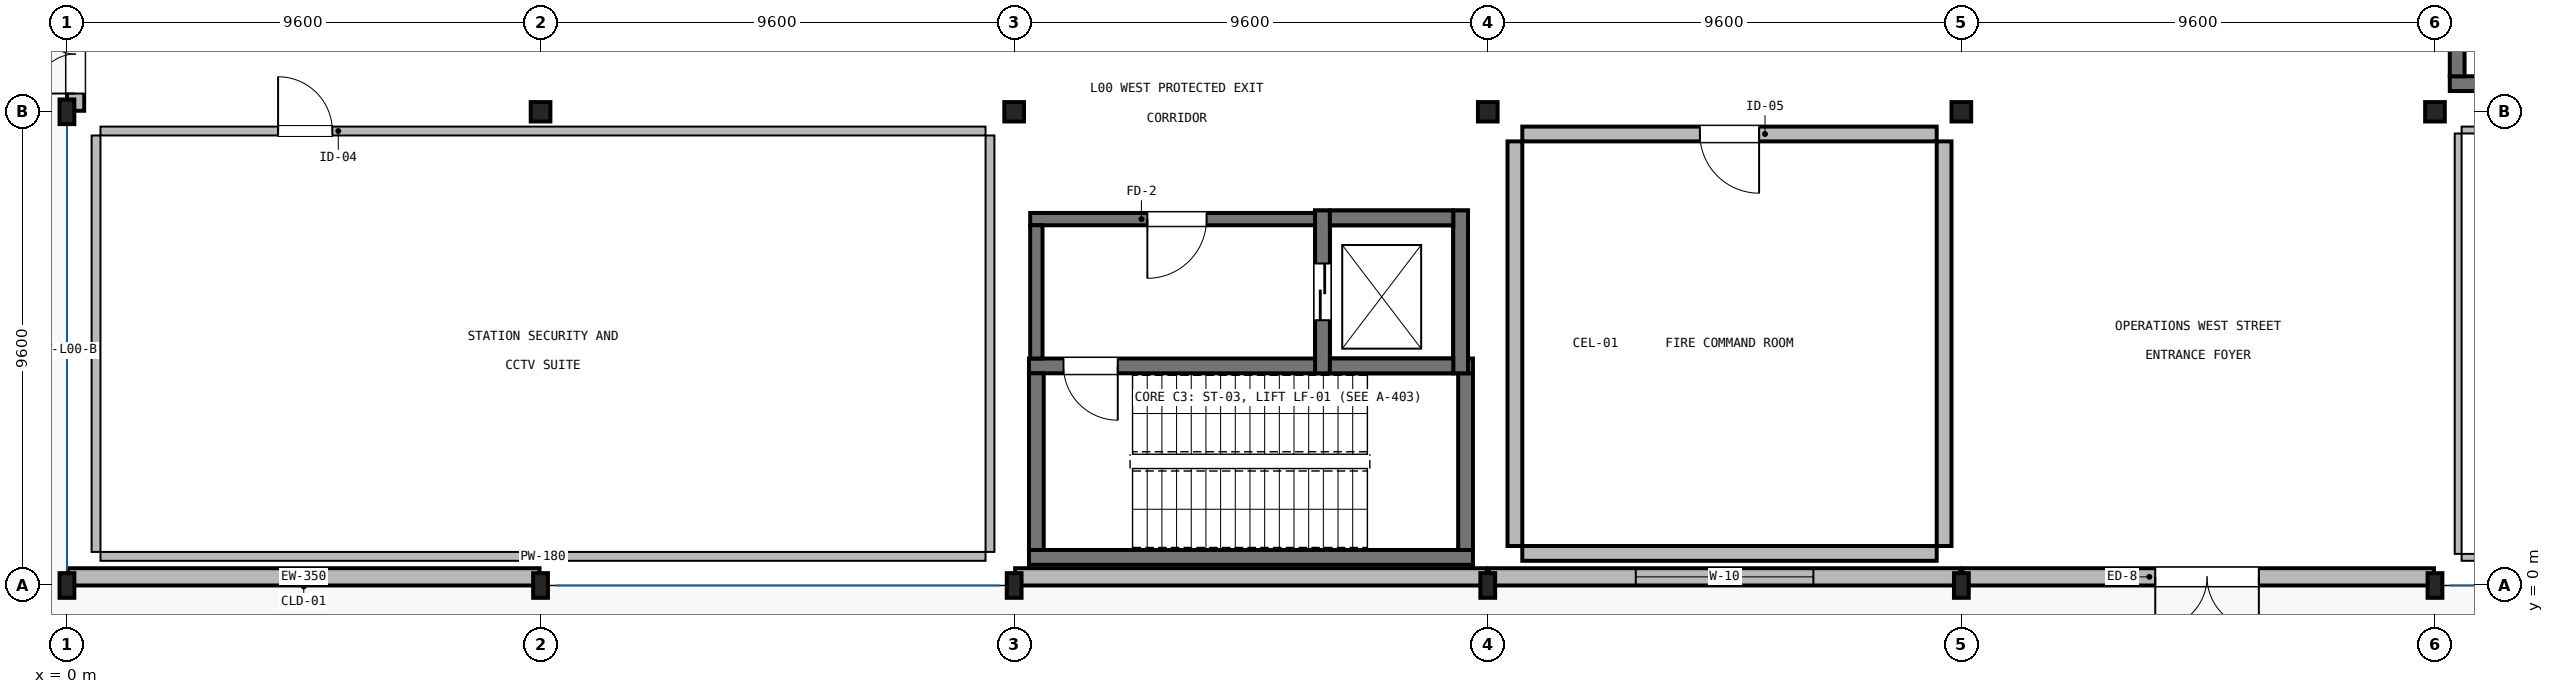
"""IFC4 building model, lengths in metres.
Left out: names, types, materials, properties, quantities, classifications, styles, units other than length and angle.
Written with IfcOpenShell. Run it as: python <this file> out.ifc"""

import sys

from ifc_helpers import new_model, si_unit, direction, frame, frame_2d, origin, origin_2d, place, context, subcontext, project, spatial, rectangle, i_section, extrude, element, fill, save


model = new_model("IFC4")
c1 = context("Model", 3, precision=1e-05, world=origin(), true_north=direction((0.0, 1.0)))
c2 = subcontext(c1, "Body", "Model", "MODEL_VIEW")
j1 = project(units=[si_unit("LENGTHUNIT", "METRE"), si_unit("PLANEANGLEUNIT", "RADIAN")], contexts=[c1])
p1 = place(None, origin())
s1 = spatial("IfcSite", under=j1, at=p1, CompositionType="ELEMENT")
p2 = place(p1, origin())
s2 = spatial("IfcBuilding", under=s1, at=p2, CompositionType="ELEMENT")
p3 = place(p2, origin())
s3 = spatial("IfcBuildingStorey", under=s2, at=p3, CompositionType="ELEMENT", Elevation=0.0)
for number, where, z_axis, x_axis in (
    (1, (0.0, 0.0, -0.36), (0.0, 0.0, 1.0), (1.0, 0.0, 0.0)),
    (2, (0.0, 9.6, -0.36), (0.0, 0.0, 1.0), (1.0, 0.0, 0.0)),
    (3, (9.6, 0.0, -0.36), (0.0, 0.0, 1.0), (1.0, 0.0, 0.0)),
):
    element("IfcColumn", number, at=place(p3, frame(where, z_axis=z_axis, x_axis=x_axis)), inside=s3, PredefinedType="COLUMN", context=c2, shape_type="SweptSolid", body=[
        extrude(i_section(OverallWidth=0.3, OverallDepth=0.5, WebThickness=0.014, FlangeThickness=0.028, FilletRadius=0.027, at=origin_2d()), origin(), (0.0, 0.0, 1.0), 6.11),
    ])
p4 = place(p3, frame((9.6, 9.6, -0.36), z_axis=(0.0, 0.0, 1.0), x_axis=(1.0, 0.0, 0.0)))
e4 = element("IfcColumn", 4, at=p4, inside=s3, PredefinedType="COLUMN", context=c2, shape_type="SweptSolid", body=[
    extrude(i_section(OverallWidth=0.399, OverallDepth=0.394, WebThickness=0.023, FlangeThickness=0.037, FilletRadius=0.015, at=origin_2d()), origin(), (0.0, 0.0, 1.0), 6.11),
])
p5 = place(p3, frame((19.2, 0.0, -0.36), z_axis=(0.0, 0.0, 1.0), x_axis=(1.0, 0.0, 0.0)))
e5 = element("IfcColumn", 5, at=p5, inside=s3, PredefinedType="COLUMN", context=c2, shape_type="SweptSolid", body=[
    extrude(i_section(OverallWidth=0.3, OverallDepth=0.5, WebThickness=0.014, FlangeThickness=0.028, FilletRadius=0.027, at=origin_2d()), origin(), (0.0, 0.0, 1.0), 6.11),
])
p6 = place(p3, frame((19.2, 9.6, -0.36), z_axis=(0.0, 0.0, 1.0), x_axis=(1.0, 0.0, 0.0)))
e6 = element("IfcColumn", 6, at=p6, inside=s3, PredefinedType="COLUMN", context=c2, shape_type="SweptSolid", body=[
    extrude(i_section(OverallWidth=0.399, OverallDepth=0.394, WebThickness=0.023, FlangeThickness=0.037, FilletRadius=0.015, at=origin_2d()), origin(), (0.0, 0.0, 1.0), 6.11),
])
p7 = place(p3, frame((28.8, 0.0, -0.36), z_axis=(0.0, 0.0, 1.0), x_axis=(1.0, 0.0, 0.0)))
e7 = element("IfcColumn", 7, at=p7, inside=s3, PredefinedType="COLUMN", context=c2, shape_type="SweptSolid", body=[
    extrude(i_section(OverallWidth=0.3, OverallDepth=0.5, WebThickness=0.014, FlangeThickness=0.028, FilletRadius=0.027, at=origin_2d()), origin(), (0.0, 0.0, 1.0), 6.11),
])
p8 = place(p3, frame((28.8, 9.6, -0.36), z_axis=(0.0, 0.0, 1.0), x_axis=(1.0, 0.0, 0.0)))
e8 = element("IfcColumn", 8, at=p8, inside=s3, PredefinedType="COLUMN", context=c2, shape_type="SweptSolid", body=[
    extrude(i_section(OverallWidth=0.399, OverallDepth=0.394, WebThickness=0.023, FlangeThickness=0.037, FilletRadius=0.015, at=origin_2d()), origin(), (0.0, 0.0, 1.0), 6.11),
])
p9 = place(p3, frame((38.4, 0.0, -0.36), z_axis=(0.0, 0.0, 1.0), x_axis=(1.0, 0.0, 0.0)))
e9 = element("IfcColumn", 9, at=p9, inside=s3, PredefinedType="COLUMN", context=c2, shape_type="SweptSolid", body=[
    extrude(i_section(OverallWidth=0.3, OverallDepth=0.5, WebThickness=0.014, FlangeThickness=0.028, FilletRadius=0.027, at=origin_2d()), origin(), (0.0, 0.0, 1.0), 6.11),
])
p10 = place(p3, frame((38.4, 9.6, -0.36), z_axis=(0.0, 0.0, 1.0), x_axis=(1.0, 0.0, 0.0)))
e10 = element("IfcColumn", 10, at=p10, inside=s3, PredefinedType="COLUMN", context=c2, shape_type="SweptSolid", body=[
    extrude(i_section(OverallWidth=0.399, OverallDepth=0.394, WebThickness=0.023, FlangeThickness=0.037, FilletRadius=0.015, at=origin_2d()), origin(), (0.0, 0.0, 1.0), 6.11),
])
p11 = place(p3, frame((48.0, 0.0, -0.36), z_axis=(0.0, 0.0, 1.0), x_axis=(1.0, 0.0, 0.0)))
e11 = element("IfcColumn", 11, at=p11, inside=s3, PredefinedType="COLUMN", context=c2, shape_type="SweptSolid", body=[
    extrude(i_section(OverallWidth=0.3, OverallDepth=0.5, WebThickness=0.014, FlangeThickness=0.028, FilletRadius=0.027, at=origin_2d()), origin(), (0.0, 0.0, 1.0), 6.11),
])
p12 = place(p3, frame((48.0, 9.6, 0.0), z_axis=(0.0, 0.0, 1.0), x_axis=(1.0, 0.0, 0.0)))
e12 = element("IfcColumn", 12, at=p12, inside=s3, PredefinedType="COLUMN", context=c2, shape_type="SweptSolid", body=[
    extrude(i_section(OverallWidth=0.399, OverallDepth=0.394, WebThickness=0.023, FlangeThickness=0.037, FilletRadius=0.015, at=origin_2d()), origin(), (0.0, 0.0, 1.0), 5.75),
])
p13 = place(p3, frame((48.3, 10.17, 0.0), z_axis=(0.0, 0.0, 1.0), x_axis=(1.0, 0.0, 0.0)))
e13 = element("IfcWall", 13, at=p13, inside=s3, PredefinedType="SHEAR", context=c2, shape_type="SweptSolid", body=[
    extrude(rectangle(XDim=9.0, YDim=0.3, at=frame_2d((4.5, 0.0))), origin(), (0.0, 0.0, 1.0), 5.75),
])
p14 = place(p3, frame((48.45, 10.32, 0.0), z_axis=(0.0, 0.0, 1.0), x_axis=(0.0, 1.0, 0.0)))
e14 = element("IfcWall", 14, at=p14, inside=s3, PredefinedType="SHEAR", context=c2, shape_type="SweptSolid", body=[
    extrude(rectangle(XDim=3.58, YDim=0.3, at=frame_2d((1.79, 0.0))), origin(), (0.0, 0.0, 1.0), 5.75),
])
p15 = place(p3, frame((19.5, 0.57, 0.0), z_axis=(0.0, 0.0, 1.0), x_axis=(1.0, 0.0, 0.0)))
e15 = element("IfcWall", 15, at=p15, inside=s3, PredefinedType="SHEAR", context=c2, shape_type="SweptSolid", body=[
    extrude(rectangle(XDim=9.0, YDim=0.3, at=frame_2d((4.5, 0.0))), origin(), (0.0, 0.0, 1.0), 5.75),
])
p16 = place(p3, frame((28.5, 4.45, 0.0), z_axis=(0.0, 0.0, 1.0), x_axis=(-1.0, 0.0, 0.0)))
e16 = element("IfcWall", 16, at=p16, inside=s3, PredefinedType="SHEAR", context=c2, shape_type="SweptSolid", body=[
    extrude(rectangle(XDim=9.0, YDim=0.3, at=frame_2d((4.5, 0.0))), origin(), (0.0, 0.0, 1.0), 5.75),
])
p17 = place(p16, frame((7.2, 0.0, 0.0)))
e17 = element("IfcOpeningElement", 17, at=p17, cuts=e16, PredefinedType="OPENING", context=c2, shape_type="SweptSolid", body=[
    extrude(rectangle(XDim=1.1, YDim=2.15, at=frame_2d((0.55, 1.075))), frame((0.0, 0.16, 0.0), z_axis=(0.0, -1.0, 0.0), x_axis=(1.0, 0.0, 0.0)), (0.0, 0.0, 1.0), 0.32),
])
for number, where, z_axis, x_axis in (
    (18, (19.65, 0.72, 0.0), (0.0, 0.0, 1.0), (0.0, 1.0, 0.0)),
    (19, (28.35, 4.3, 0.0), (0.0, 0.0, 1.0), (0.0, -1.0, 0.0)),
):
    element("IfcWall", number, at=place(p3, frame(where, z_axis=z_axis, x_axis=x_axis)), inside=s3, PredefinedType="SHEAR", context=c2, shape_type="SweptSolid", body=[
        extrude(rectangle(XDim=3.58, YDim=0.3, at=frame_2d((1.79, 0.0))), origin(), (0.0, 0.0, 1.0), 5.75),
    ])
p18 = place(p3, frame((25.45, 7.3, 0.0), z_axis=(0.0, 0.0, 1.0), x_axis=(0.0, -1.0, 0.0)))
e20 = element("IfcWall", 20, at=p18, inside=s3, PredefinedType="SHEAR", context=c2, shape_type="SweptSolid", body=[
    extrude(rectangle(XDim=2.7, YDim=0.3, at=frame_2d((1.35, 0.0))), origin(), (0.0, 0.0, 1.0), 5.75),
])
p19 = place(p18, frame((0.775, 0.0, 0.0)))
e21 = element("IfcOpeningElement", 21, at=p19, cuts=e20, PredefinedType="OPENING", context=c2, shape_type="SweptSolid", body=[
    extrude(rectangle(XDim=1.15, YDim=2.1, at=frame_2d((0.575, 1.05))), frame((0.0, 0.16, 0.0), z_axis=(0.0, -1.0, 0.0), x_axis=(1.0, 0.0, 0.0)), (0.0, 0.0, 1.0), 0.32),
])
p20 = place(p3, frame((28.25, 4.6, 0.0), z_axis=(0.0, 0.0, 1.0), x_axis=(0.0, 1.0, 0.0)))
e22 = element("IfcWall", 22, at=p20, inside=s3, PredefinedType="SHEAR", context=c2, shape_type="SweptSolid", body=[
    extrude(rectangle(XDim=2.7, YDim=0.3, at=frame_2d((1.35, 0.0))), origin(), (0.0, 0.0, 1.0), 5.75),
])
p21 = place(p3, frame((25.3, 7.45, 0.0), z_axis=(0.0, 0.0, 1.0), x_axis=(1.0, 0.0, 0.0)))
e23 = element("IfcWall", 23, at=p21, inside=s3, PredefinedType="SHEAR", context=c2, shape_type="SweptSolid", body=[
    extrude(rectangle(XDim=3.1, YDim=0.3, at=frame_2d((1.55, 0.0))), origin(), (0.0, 0.0, 1.0), 5.75),
])
p22 = place(p3, frame((25.3, 7.425, 0.0), z_axis=(0.0, 0.0, 1.0), x_axis=(-1.0, 0.0, 0.0)))
e24 = element("IfcWall", 24, at=p22, inside=s3, PredefinedType="SHEAR", context=c2, shape_type="SweptSolid", body=[
    extrude(rectangle(XDim=5.775, YDim=0.25, at=frame_2d((2.888, 0.0))), origin(), (0.0, 0.0, 1.0), 5.75),
])
p23 = place(p22, frame((2.2, 0.0, 0.0)))
e25 = element("IfcOpeningElement", 25, at=p23, cuts=e24, PredefinedType="OPENING", context=c2, shape_type="SweptSolid", body=[
    extrude(rectangle(XDim=1.2, YDim=2.15, at=frame_2d((0.6, 1.075))), frame((0.0, 0.135, 0.0), z_axis=(0.0, -1.0, 0.0), x_axis=(1.0, 0.0, 0.0)), (0.0, 0.0, 1.0), 0.27),
])
p24 = place(p3, frame((19.65, 4.6, 0.0), z_axis=(0.0, 0.0, 1.0), x_axis=(0.0, 1.0, 0.0)))
e26 = element("IfcWall", 26, at=p24, inside=s3, PredefinedType="SHEAR", context=c2, shape_type="SweptSolid", body=[
    extrude(rectangle(XDim=2.7, YDim=0.25, at=frame_2d((1.35, 0.0))), origin(), (0.0, 0.0, 1.0), 5.75),
])
for number, where, z_axis, x_axis in (
    (27, (25.45, 4.3, -1.2), (0.0, 0.0, 1.0), (0.0, 1.0, 0.0)),
    (28, (28.25, 4.3, -1.2), (0.0, 0.0, 1.0), (0.0, 1.0, 0.0)),
):
    element("IfcWall", number, at=place(p3, frame(where, z_axis=z_axis, x_axis=x_axis)), inside=s3, PredefinedType="SHEAR", context=c2, shape_type="SweptSolid", body=[
        extrude(rectangle(XDim=3.3, YDim=0.3, at=frame_2d((1.65, 0.0))), origin(), (0.0, 0.0, 1.0), 0.82),
    ])
for number, where, z_axis, x_axis in (
    (29, (25.6, 4.45, -1.2), (0.0, 0.0, 1.0), (1.0, 0.0, 0.0)),
    (30, (25.6, 7.45, -1.2), (0.0, 0.0, 1.0), (1.0, 0.0, 0.0)),
):
    element("IfcWall", number, at=place(p3, frame(where, z_axis=z_axis, x_axis=x_axis)), inside=s3, PredefinedType="SHEAR", context=c2, shape_type="SweptSolid", body=[
        extrude(rectangle(XDim=2.5, YDim=0.3, at=frame_2d((1.25, 0.0))), origin(), (0.0, 0.0, 1.0), 0.82),
    ])
p25 = place(p3, frame((9.58, 0.175, 0.0), z_axis=(0.0, 0.0, 1.0), x_axis=(-1.0, 0.0, 0.0)))
e31 = element("IfcWall", 31, at=p25, inside=s3, PredefinedType="SOLIDWALL", context=c2, shape_type="SweptSolid", body=[
    extrude(rectangle(XDim=9.56, YDim=0.35, at=frame_2d((4.78, 0.0))), origin(), (0.0, 0.0, 1.0), 5.4),
])
p26 = place(p3, frame((0.175, 9.62, 0.0), z_axis=(0.0, 0.0, 1.0), x_axis=(0.0, 1.0, 0.0)))
e32 = element("IfcWall", 32, at=p26, inside=s3, PredefinedType="SOLIDWALL", context=c2, shape_type="SweptSolid", body=[
    extrude(rectangle(XDim=9.56, YDim=0.35, at=frame_2d((4.78, 0.0))), origin(), (0.0, 0.0, 1.0), 5.217),
])
p27 = place(p26, frame((0.35, 0.0, 0.0)))
e33 = element("IfcOpeningElement", 33, at=p27, cuts=e32, PredefinedType="OPENING", context=c2, shape_type="SweptSolid", body=[
    extrude(rectangle(XDim=1.6, YDim=2.2, at=frame_2d((0.8, 1.1))), frame((0.0, 0.185, 0.0), z_axis=(0.0, -1.0, 0.0), x_axis=(1.0, 0.0, 0.0)), (0.0, 0.0, 1.0), 0.37),
])
p28 = place(p3, frame((28.78, 0.175, 0.0), z_axis=(0.0, 0.0, 1.0), x_axis=(-1.0, 0.0, 0.0)))
e34 = element("IfcWall", 34, at=p28, inside=s3, PredefinedType="SOLIDWALL", context=c2, shape_type="SweptSolid", body=[
    extrude(rectangle(XDim=9.56, YDim=0.35, at=frame_2d((4.78, 0.0))), origin(), (0.0, 0.0, 1.0), 5.4),
])
p29 = place(p3, frame((38.38, 0.175, 0.0), z_axis=(0.0, 0.0, 1.0), x_axis=(-1.0, 0.0, 0.0)))
e35 = element("IfcWall", 35, at=p29, inside=s3, PredefinedType="SOLIDWALL", context=c2, shape_type="SweptSolid", body=[
    extrude(rectangle(XDim=9.56, YDim=0.35, at=frame_2d((4.78, 0.0))), origin(), (0.0, 0.0, 1.0), 5.4),
])
p30 = place(p29, frame((2.98, 0.0, 1.3)))
e36 = element("IfcOpeningElement", 36, at=p30, cuts=e35, PredefinedType="OPENING", context=c2, shape_type="SweptSolid", body=[
    extrude(rectangle(XDim=3.6, YDim=1.2, at=frame_2d((1.8, 0.6))), frame((0.0, 0.185, 0.0), z_axis=(0.0, -1.0, 0.0), x_axis=(1.0, 0.0, 0.0)), (0.0, 0.0, 1.0), 0.37),
])
p31 = place(p3, frame((47.98, 0.175, 0.0), z_axis=(0.0, 0.0, 1.0), x_axis=(-1.0, 0.0, 0.0)))
e37 = element("IfcWall", 37, at=p31, inside=s3, PredefinedType="SOLIDWALL", context=c2, shape_type="SweptSolid", body=[
    extrude(rectangle(XDim=9.56, YDim=0.35, at=frame_2d((4.78, 0.0))), origin(), (0.0, 0.0, 1.0), 5.4),
])
p32 = place(p31, frame((3.55, 0.0, 0.0)))
e38 = element("IfcOpeningElement", 38, at=p32, cuts=e37, PredefinedType="OPENING", context=c2, shape_type="SweptSolid", body=[
    extrude(rectangle(XDim=2.1, YDim=2.35, at=frame_2d((1.05, 1.175))), frame((0.0, 0.185, 0.0), z_axis=(0.0, -1.0, 0.0), x_axis=(1.0, 0.0, 0.0)), (0.0, 0.0, 1.0), 0.37),
])
p33 = place(p3, frame((37.9, 0.65, 0.0), z_axis=(0.0, 0.0, 1.0), x_axis=(-1.0, 0.0, 0.0)))
e39 = element("IfcWall", 39, at=p33, inside=s3, PredefinedType="SHEAR", context=c2, shape_type="SweptSolid", body=[
    extrude(rectangle(XDim=8.4, YDim=0.3, at=frame_2d((4.2, 0.0))), origin(), (0.0, 0.0, 1.0), 5.39),
])
p34 = place(p3, frame((29.5, 9.15, 0.0), z_axis=(0.0, 0.0, 1.0), x_axis=(1.0, 0.0, 0.0)))
e40 = element("IfcWall", 40, at=p34, inside=s3, PredefinedType="SHEAR", context=c2, shape_type="SweptSolid", body=[
    extrude(rectangle(XDim=8.4, YDim=0.3, at=frame_2d((4.2, 0.0))), origin(), (0.0, 0.0, 1.0), 5.39),
])
p35 = place(p34, frame((3.6, 0.0, 0.0)))
e41 = element("IfcOpeningElement", 41, at=p35, cuts=e40, PredefinedType="OPENING", context=c2, shape_type="SweptSolid", body=[
    extrude(rectangle(XDim=1.2, YDim=2.2, at=frame_2d((0.6, 1.1))), frame((0.0, 0.16, 0.0), z_axis=(0.0, -1.0, 0.0), x_axis=(1.0, 0.0, 0.0)), (0.0, 0.0, 1.0), 0.32),
])
for number, where, z_axis, x_axis in (
    (42, (29.35, 0.8, 0.0), (0.0, 0.0, 1.0), (0.0, 1.0, 0.0)),
    (43, (38.05, 9.0, 0.0), (0.0, 0.0, 1.0), (0.0, -1.0, 0.0)),
):
    element("IfcWall", number, at=place(p3, frame(where, z_axis=z_axis, x_axis=x_axis)), inside=s3, PredefinedType="SHEAR", context=c2, shape_type="SweptSolid", body=[
        extrude(rectangle(XDim=8.2, YDim=0.3, at=frame_2d((4.1, 0.0))), origin(), (0.0, 0.0, 1.0), 5.39),
    ])
p36 = place(p3, frame((18.62, 0.59, 0.0), z_axis=(0.0, 0.0, 1.0), x_axis=(-1.0, 0.0, 0.0)))
e44 = element("IfcWall", 44, at=p36, inside=s3, PredefinedType="PARTITIONING", context=c2, shape_type="SweptSolid", body=[
    extrude(rectangle(XDim=17.94, YDim=0.18, at=frame_2d((8.97, 0.0))), origin(), (0.0, 0.0, 1.0), 5.207),
])
p37 = place(p3, frame((0.68, 9.21, 0.0), z_axis=(0.0, 0.0, 1.0), x_axis=(1.0, 0.0, 0.0)))
e45 = element("IfcWall", 45, at=p37, inside=s3, PredefinedType="PARTITIONING", context=c2, shape_type="SweptSolid", body=[
    extrude(rectangle(XDim=17.94, YDim=0.18, at=frame_2d((8.97, 0.0))), origin(), (0.0, 0.0, 1.0), 5.207),
])
p38 = place(p37, frame((3.6, 0.0, 0.0)))
e46 = element("IfcOpeningElement", 46, at=p38, cuts=e45, PredefinedType="OPENING", context=c2, shape_type="SweptSolid", body=[
    extrude(rectangle(XDim=1.1, YDim=2.2, at=frame_2d((0.55, 1.1))), frame((0.0, 0.1, 0.0), z_axis=(0.0, -1.0, 0.0), x_axis=(1.0, 0.0, 0.0)), (0.0, 0.0, 1.0), 0.2),
])
for number, where, z_axis, x_axis in (
    (47, (0.59, 0.68, 0.0), (0.0, 0.0, 1.0), (0.0, 1.0, 0.0)),
    (48, (18.71, 9.12, 0.0), (0.0, 0.0, 1.0), (0.0, -1.0, 0.0)),
):
    element("IfcWall", number, at=place(p3, frame(where, z_axis=z_axis, x_axis=x_axis)), inside=s3, PredefinedType="PARTITIONING", context=c2, shape_type="SweptSolid", body=[
        extrude(rectangle(XDim=8.44, YDim=0.18, at=frame_2d((4.22, 0.0))), origin(), (0.0, 0.0, 1.0), 5.39),
    ])
p39 = place(p3, frame((66.66, 0.57, 0.0), z_axis=(0.0, 0.0, 1.0), x_axis=(-1.0, 0.0, 0.0)))
e49 = element("IfcWall", 49, at=p39, inside=s3, PredefinedType="PARTITIONING", context=c2, shape_type="SweptSolid", body=[
    extrude(rectangle(XDim=18.12, YDim=0.14, at=frame_2d((9.06, 0.0))), origin(), (0.0, 0.0, 1.0), 5.207),
])
p40 = place(p3, frame((48.54, 9.23, 0.0), z_axis=(0.0, 0.0, 1.0), x_axis=(1.0, 0.0, 0.0)))
e50 = element("IfcWall", 50, at=p40, inside=s3, PredefinedType="PARTITIONING", context=c2, shape_type="SweptSolid", body=[
    extrude(rectangle(XDim=18.12, YDim=0.14, at=frame_2d((9.06, 0.0))), origin(), (0.0, 0.0, 1.0), 5.207),
])
p41 = place(p40, frame((3.6, 0.0, 0.0)))
e51 = element("IfcOpeningElement", 51, at=p41, cuts=e50, PredefinedType="OPENING", context=c2, shape_type="SweptSolid", body=[
    extrude(rectangle(XDim=1.06, YDim=2.2, at=frame_2d((0.53, 1.1))), frame((0.0, 0.08, 0.0), z_axis=(0.0, -1.0, 0.0), x_axis=(1.0, 0.0, 0.0)), (0.0, 0.0, 1.0), 0.16),
])
p42 = place(p3, frame((48.47, 0.64, 0.0), z_axis=(0.0, 0.0, 1.0), x_axis=(0.0, 1.0, 0.0)))
e52 = element("IfcWall", 52, at=p42, inside=s3, PredefinedType="PARTITIONING", context=c2, shape_type="SweptSolid", body=[
    extrude(rectangle(XDim=8.52, YDim=0.14, at=frame_2d((4.26, 0.0))), origin(), (0.0, 0.0, 1.0), 5.39),
])
p43 = place(p17, origin())
e53 = element("IfcDoor", 53, at=p43, inside=s3, OperationType="SINGLE_SWING_LEFT", PredefinedType="DOOR", context=c2, shape_type="SweptSolid", body=[
    extrude(rectangle(XDim=1.1, YDim=2.15, at=frame_2d((0.55, 1.075))), frame((0.0, 0.025, 0.0), z_axis=(0.0, -1.0, 0.0), x_axis=(1.0, 0.0, 0.0)), (0.0, 0.0, 1.0), 0.05),
])
fill(e17, e53)
p44 = place(p19, frame((1.15, 0.0, 0.0), z_axis=(0.0, 0.0, 1.0), x_axis=(-1.0, 0.0, 0.0)))
e54 = element("IfcDoor", 54, at=p44, inside=s3, OperationType="DOUBLE_DOOR_SLIDING", PredefinedType="DOOR", context=c2, shape_type="SweptSolid", body=[
    extrude(rectangle(XDim=1.15, YDim=2.1, at=frame_2d((0.575, 1.05))), frame((0.0, 0.025, 0.0), z_axis=(0.0, -1.0, 0.0), x_axis=(1.0, 0.0, 0.0)), (0.0, 0.0, 1.0), 0.05),
])
fill(e21, e54)
p45 = place(p23, origin())
e55 = element("IfcDoor", 55, at=p45, inside=s3, OperationType="SINGLE_SWING_RIGHT", PredefinedType="DOOR", context=c2, shape_type="SweptSolid", body=[
    extrude(rectangle(XDim=1.2, YDim=2.15, at=frame_2d((0.6, 1.075))), frame((0.0, 0.025, 0.0), z_axis=(0.0, -1.0, 0.0), x_axis=(1.0, 0.0, 0.0)), (0.0, 0.0, 1.0), 0.05),
])
fill(e25, e55)
p46 = place(p27, origin())
e56 = element("IfcDoor", 56, at=p46, inside=s3, OperationType="DOUBLE_DOOR_SINGLE_SWING", PredefinedType="DOOR", context=c2, shape_type="SweptSolid", body=[
    extrude(rectangle(XDim=1.6, YDim=2.2, at=frame_2d((0.8, 1.1))), frame((0.0, 0.025, 0.0), z_axis=(0.0, -1.0, 0.0), x_axis=(1.0, 0.0, 0.0)), (0.0, 0.0, 1.0), 0.05),
])
fill(e33, e56)
p47 = place(p30, origin())
e57 = element("IfcWindow", 57, at=p47, inside=s3, PartitioningType="SINGLE_PANEL", PredefinedType="WINDOW", context=c2, shape_type="SweptSolid", body=[
    extrude(rectangle(XDim=3.6, YDim=1.2, at=frame_2d((1.8, 0.6))), frame((0.0, 0.03, 0.0), z_axis=(0.0, -1.0, 0.0), x_axis=(1.0, 0.0, 0.0)), (0.0, 0.0, 1.0), 0.06),
])
fill(e36, e57)
p48 = place(p32, origin())
e58 = element("IfcDoor", 58, at=p48, inside=s3, OperationType="DOUBLE_DOOR_SINGLE_SWING", PredefinedType="DOOR", context=c2, shape_type="SweptSolid", body=[
    extrude(rectangle(XDim=2.1, YDim=2.35, at=frame_2d((1.05, 1.175))), frame((0.0, 0.025, 0.0), z_axis=(0.0, -1.0, 0.0), x_axis=(1.0, 0.0, 0.0)), (0.0, 0.0, 1.0), 0.05),
])
fill(e38, e58)
p49 = place(p35, frame((1.2, 0.0, 0.0), z_axis=(0.0, 0.0, 1.0), x_axis=(-1.0, 0.0, 0.0)))
e59 = element("IfcDoor", 59, at=p49, inside=s3, OperationType="SINGLE_SWING_RIGHT", PredefinedType="DOOR", context=c2, shape_type="SweptSolid", body=[
    extrude(rectangle(XDim=1.2, YDim=2.2, at=frame_2d((0.6, 1.1))), frame((0.0, 0.025, 0.0), z_axis=(0.0, -1.0, 0.0), x_axis=(1.0, 0.0, 0.0)), (0.0, 0.0, 1.0), 0.05),
])
fill(e41, e59)
p50 = place(p38, origin())
e60 = element("IfcDoor", 60, at=p50, inside=s3, OperationType="SINGLE_SWING_LEFT", PredefinedType="DOOR", context=c2, shape_type="SweptSolid", body=[
    extrude(rectangle(XDim=1.1, YDim=2.2, at=frame_2d((0.55, 1.1))), frame((0.0, 0.025, 0.0), z_axis=(0.0, -1.0, 0.0), x_axis=(1.0, 0.0, 0.0)), (0.0, 0.0, 1.0), 0.05),
])
fill(e46, e60)
save(model, sys.argv[1])
